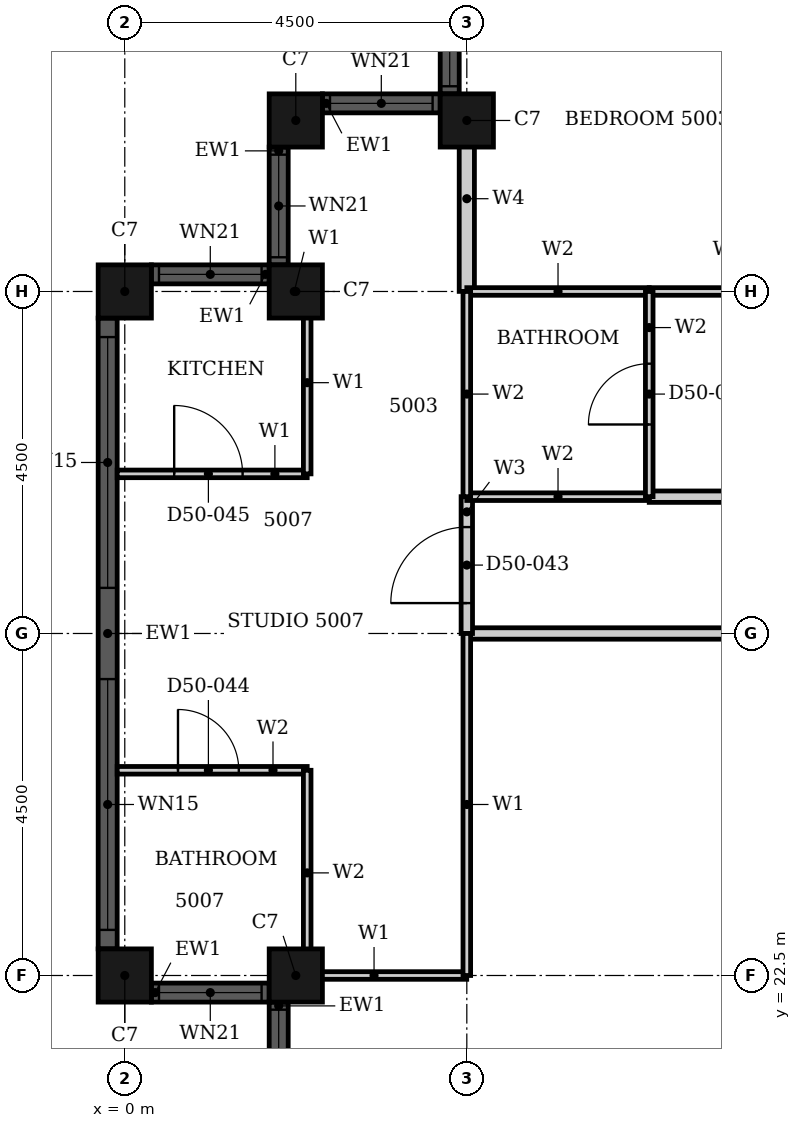
"""IFC4 building model, lengths in metres.
Left out: names, types, materials, properties, quantities, classifications, styles, units other than length and angle.
Written with IfcOpenShell. Run it as: python <this file> out.ifc"""

import sys

from ifc_helpers import new_model, si_unit, direction, frame, frame_2d, origin, origin_2d, place, context, subcontext, project, spatial, rectangle, hollow_rectangle, extrude, element, fill, save


model = new_model("IFC4")
c1 = context("Model", 3, precision=1e-05, world=origin(), true_north=direction((0.0, 1.0)))
c2 = subcontext(c1, "Body", "Model", "MODEL_VIEW")
j1 = project(units=[si_unit("LENGTHUNIT", "METRE"), si_unit("PLANEANGLEUNIT", "RADIAN")], contexts=[c1])
p1 = place(None, origin())
s1 = spatial("IfcSite", under=j1, at=p1, CompositionType="ELEMENT")
p2 = place(p1, origin())
s2 = spatial("IfcBuilding", under=s1, at=p2, CompositionType="ELEMENT")
p3 = place(p2, frame((0.0, 0.0, 199.8)))
s3 = spatial("IfcBuildingStorey", under=s2, at=p3, CompositionType="ELEMENT", Elevation=199.8)
for number, where, z_axis, x_axis in (
    (1, (4.5, 33.75, 0.0), (0.0, 0.0, 1.0), (1.0, 0.0, 0.0)),
    (2, (2.25, 33.75, 0.0), (0.0, 0.0, 1.0), (1.0, 0.0, 0.0)),
    (3, (2.25, 31.5, 0.0), (0.0, 0.0, 1.0), (1.0, 0.0, 0.0)),
    (4, (0.0, 31.5, 0.0), (0.0, 0.0, 1.0), (1.0, 0.0, 0.0)),
    (5, (0.0, 22.5, 0.0), (0.0, 0.0, 1.0), (1.0, 0.0, 0.0)),
    (6, (2.25, 22.5, 0.0), (0.0, 0.0, 1.0), (1.0, 0.0, 0.0)),
):
    element("IfcColumn", number, at=place(p3, frame(where, z_axis=z_axis, x_axis=x_axis)), inside=s3, PredefinedType="COLUMN", context=c2, shape_type="SweptSolid", body=[
        extrude(hollow_rectangle(XDim=0.7, YDim=0.7, WallThickness=0.022, at=origin_2d()), origin(), (0.0, 0.0, 1.0), 3.7),
    ])
p4 = place(p3, frame((4.275, 35.65, 0.0), z_axis=(0.0, 0.0, 1.0), x_axis=(0.0, -1.0, 0.0)))
e7 = element("IfcWall", 7, at=p4, inside=s3, PredefinedType="SOLIDWALL", context=c2, shape_type="SweptSolid", body=[
    extrude(rectangle(XDim=1.55, YDim=0.25, at=frame_2d((0.775, 0.0))), origin(), (0.0, 0.0, 1.0), 3.7),
])
p5 = place(p4, frame((0.1, 0.0, 0.9)))
e8 = element("IfcOpeningElement", 8, at=p5, cuts=e7, PredefinedType="OPENING", context=c2, shape_type="SweptSolid", body=[
    extrude(rectangle(XDim=1.35, YDim=1.85, at=frame_2d((0.675, 0.925))), frame((0.0, 0.135, 0.0), z_axis=(0.0, -1.0, 0.0), x_axis=(1.0, 0.0, 0.0)), (0.0, 0.0, 1.0), 0.27),
])
p6 = place(p3, frame((4.15, 33.975, 0.0), z_axis=(0.0, 0.0, 1.0), x_axis=(-1.0, 0.0, 0.0)))
e9 = element("IfcWall", 9, at=p6, inside=s3, PredefinedType="SOLIDWALL", context=c2, shape_type="SweptSolid", body=[
    extrude(rectangle(XDim=1.55, YDim=0.25, at=frame_2d((0.775, 0.0))), origin(), (0.0, 0.0, 1.0), 3.7),
])
p7 = place(p6, frame((0.1, 0.0, 0.9)))
e10 = element("IfcOpeningElement", 10, at=p7, cuts=e9, PredefinedType="OPENING", context=c2, shape_type="SweptSolid", body=[
    extrude(rectangle(XDim=1.35, YDim=1.85, at=frame_2d((0.675, 0.925))), frame((0.0, 0.135, 0.0), z_axis=(0.0, -1.0, 0.0), x_axis=(1.0, 0.0, 0.0)), (0.0, 0.0, 1.0), 0.27),
])
p8 = place(p3, frame((2.025, 33.4, 0.0), z_axis=(0.0, 0.0, 1.0), x_axis=(0.0, -1.0, 0.0)))
e11 = element("IfcWall", 11, at=p8, inside=s3, PredefinedType="SOLIDWALL", context=c2, shape_type="SweptSolid", body=[
    extrude(rectangle(XDim=1.55, YDim=0.25, at=frame_2d((0.775, 0.0))), origin(), (0.0, 0.0, 1.0), 3.7),
])
p9 = place(p8, frame((0.1, 0.0, 0.9)))
e12 = element("IfcOpeningElement", 12, at=p9, cuts=e11, PredefinedType="OPENING", context=c2, shape_type="SweptSolid", body=[
    extrude(rectangle(XDim=1.35, YDim=1.85, at=frame_2d((0.675, 0.925))), frame((0.0, 0.135, 0.0), z_axis=(0.0, -1.0, 0.0), x_axis=(1.0, 0.0, 0.0)), (0.0, 0.0, 1.0), 0.27),
])
p10 = place(p3, frame((1.9, 31.725, 0.0), z_axis=(0.0, 0.0, 1.0), x_axis=(-1.0, 0.0, 0.0)))
e13 = element("IfcWall", 13, at=p10, inside=s3, PredefinedType="SOLIDWALL", context=c2, shape_type="SweptSolid", body=[
    extrude(rectangle(XDim=1.55, YDim=0.25, at=frame_2d((0.775, 0.0))), origin(), (0.0, 0.0, 1.0), 3.7),
])
p11 = place(p10, frame((0.1, 0.0, 0.9)))
e14 = element("IfcOpeningElement", 14, at=p11, cuts=e13, PredefinedType="OPENING", context=c2, shape_type="SweptSolid", body=[
    extrude(rectangle(XDim=1.35, YDim=1.85, at=frame_2d((0.675, 0.925))), frame((0.0, 0.135, 0.0), z_axis=(0.0, -1.0, 0.0), x_axis=(1.0, 0.0, 0.0)), (0.0, 0.0, 1.0), 0.27),
])
p12 = place(p3, frame((-0.225, 31.15, 0.0), z_axis=(0.0, 0.0, 1.0), x_axis=(0.0, -1.0, 0.0)))
e15 = element("IfcWall", 15, at=p12, inside=s3, PredefinedType="SOLIDWALL", context=c2, shape_type="SweptSolid", body=[
    extrude(rectangle(XDim=8.3, YDim=0.25, at=frame_2d((4.15, 0.0))), origin(), (0.0, 0.0, 1.0), 3.7),
])
p13 = place(p12, frame((0.25, 0.0, 0.45)))
e16 = element("IfcOpeningElement", 16, at=p13, cuts=e15, PredefinedType="OPENING", context=c2, shape_type="SweptSolid", body=[
    extrude(rectangle(XDim=3.3, YDim=2.3, at=frame_2d((1.65, 1.15))), frame((0.0, 0.135, 0.0), z_axis=(0.0, -1.0, 0.0), x_axis=(1.0, 0.0, 0.0)), (0.0, 0.0, 1.0), 0.27),
])
p14 = place(p12, frame((4.75, 0.0, 0.45)))
e17 = element("IfcOpeningElement", 17, at=p14, cuts=e15, PredefinedType="OPENING", context=c2, shape_type="SweptSolid", body=[
    extrude(rectangle(XDim=3.3, YDim=2.3, at=frame_2d((1.65, 1.15))), frame((0.0, 0.135, 0.0), z_axis=(0.0, -1.0, 0.0), x_axis=(1.0, 0.0, 0.0)), (0.0, 0.0, 1.0), 0.27),
])
p15 = place(p3, frame((0.35, 22.275, 0.0), z_axis=(0.0, 0.0, 1.0), x_axis=(1.0, 0.0, 0.0)))
e18 = element("IfcWall", 18, at=p15, inside=s3, PredefinedType="SOLIDWALL", context=c2, shape_type="SweptSolid", body=[
    extrude(rectangle(XDim=1.55, YDim=0.25, at=frame_2d((0.775, 0.0))), origin(), (0.0, 0.0, 1.0), 3.7),
])
p16 = place(p15, frame((0.1, 0.0, 0.9)))
e19 = element("IfcOpeningElement", 19, at=p16, cuts=e18, PredefinedType="OPENING", context=c2, shape_type="SweptSolid", body=[
    extrude(rectangle(XDim=1.35, YDim=1.85, at=frame_2d((0.675, 0.925))), frame((0.0, 0.135, 0.0), z_axis=(0.0, -1.0, 0.0), x_axis=(1.0, 0.0, 0.0)), (0.0, 0.0, 1.0), 0.27),
])
p17 = place(p3, frame((2.025, 22.15, 0.0), z_axis=(0.0, 0.0, 1.0), x_axis=(0.0, -1.0, 0.0)))
e20 = element("IfcWall", 20, at=p17, inside=s3, PredefinedType="SOLIDWALL", context=c2, shape_type="SweptSolid", body=[
    extrude(rectangle(XDim=1.55, YDim=0.25, at=frame_2d((0.775, 0.0))), origin(), (0.0, 0.0, 1.0), 3.7),
])
p18 = place(p17, frame((0.1, 0.0, 0.9)))
e21 = element("IfcOpeningElement", 21, at=p18, cuts=e20, PredefinedType="OPENING", context=c2, shape_type="SweptSolid", body=[
    extrude(rectangle(XDim=1.35, YDim=1.85, at=frame_2d((0.675, 0.925))), frame((0.0, 0.135, 0.0), z_axis=(0.0, -1.0, 0.0), x_axis=(1.0, 0.0, 0.0)), (0.0, 0.0, 1.0), 0.27),
])
p19 = place(p3, frame((4.5, 27.0, 0.0), z_axis=(0.0, 0.0, 1.0), x_axis=(1.0, 0.0, 0.0)))
e22 = element("IfcWall", 22, at=p19, inside=s3, PredefinedType="PARTITIONING", context=c2, shape_type="SweptSolid", body=[
    extrude(rectangle(XDim=13.5, YDim=0.15, at=frame_2d((6.75, 0.0))), origin(), (0.0, 0.0, 1.0), 2.68),
])
p20 = place(p19, frame((5.35, 0.0, 0.0)))
e23 = element("IfcOpeningElement", 23, at=p20, cuts=e22, PredefinedType="OPENING", context=c2, shape_type="SweptSolid", body=[
    extrude(rectangle(XDim=1.0, YDim=2.1, at=frame_2d((0.5, 1.05))), frame((0.0, 0.085, 0.0), z_axis=(0.0, -1.0, 0.0), x_axis=(1.0, 0.0, 0.0)), (0.0, 0.0, 1.0), 0.17),
])
p21 = place(p3, frame((6.9, 28.8, 0.0), z_axis=(0.0, 0.0, 1.0), x_axis=(1.0, 0.0, 0.0)))
e24 = element("IfcWall", 24, at=p21, inside=s3, PredefinedType="PARTITIONING", context=c2, shape_type="SweptSolid", body=[
    extrude(rectangle(XDim=9.299, YDim=0.15, at=frame_2d((4.649, 0.0))), origin(), (0.0, 0.0, 1.0), 3.4),
])
p22 = place(p21, frame((1.3, 0.0, 0.0)))
e25 = element("IfcOpeningElement", 25, at=p22, cuts=e24, PredefinedType="OPENING", context=c2, shape_type="SweptSolid", body=[
    extrude(rectangle(XDim=1.0, YDim=2.2, at=frame_2d((0.5, 1.1))), frame((0.0, 0.085, 0.0), z_axis=(0.0, -1.0, 0.0), x_axis=(1.0, 0.0, 0.0)), (0.0, 0.0, 1.0), 0.17),
])
p23 = place(p3, frame((4.5, 27.0, 0.0), z_axis=(0.0, 0.0, 1.0), x_axis=(0.0, 1.0, 0.0)))
e26 = element("IfcWall", 26, at=p23, inside=s3, PredefinedType="PARTITIONING", context=c2, shape_type="SweptSolid", body=[
    extrude(rectangle(XDim=1.8, YDim=0.15, at=frame_2d((0.9, 0.0))), origin(), (0.0, 0.0, 1.0), 3.4),
])
p24 = place(p23, frame((0.4, 0.0, 0.0)))
e27 = element("IfcOpeningElement", 27, at=p24, cuts=e26, PredefinedType="OPENING", context=c2, shape_type="SweptSolid", body=[
    extrude(rectangle(XDim=1.0, YDim=2.2, at=frame_2d((0.5, 1.1))), frame((0.0, 0.085, 0.0), z_axis=(0.0, -1.0, 0.0), x_axis=(1.0, 0.0, 0.0)), (0.0, 0.0, 1.0), 0.17),
])
p25 = place(p3, frame((2.06, 22.5, 0.0), z_axis=(0.0, 0.0, 1.0), x_axis=(1.0, 0.0, 0.0)))
e28 = element("IfcWall", 28, at=p25, inside=s3, PredefinedType="PARTITIONING", context=c2, shape_type="SweptSolid", body=[
    extrude(rectangle(XDim=2.439, YDim=0.1, at=frame_2d((1.219, 0.0))), origin(), (0.0, 0.0, 1.0), 2.68),
])
p26 = place(p3, frame((-0.1, 29.1, 0.0), z_axis=(0.0, 0.0, 1.0), x_axis=(1.0, 0.0, 0.0)))
e29 = element("IfcWall", 29, at=p26, inside=s3, PredefinedType="PARTITIONING", context=c2, shape_type="SweptSolid", body=[
    extrude(rectangle(XDim=2.5, YDim=0.1, at=frame_2d((1.25, 0.0))), origin(), (0.0, 0.0, 1.0), 3.4),
])
p27 = place(p26, frame((0.75, 0.0, 0.0)))
e30 = element("IfcOpeningElement", 30, at=p27, cuts=e29, PredefinedType="OPENING", context=c2, shape_type="SweptSolid", body=[
    extrude(rectangle(XDim=0.9, YDim=2.1, at=frame_2d((0.45, 1.05))), frame((0.0, 0.06, 0.0), z_axis=(0.0, -1.0, 0.0), x_axis=(1.0, 0.0, 0.0)), (0.0, 0.0, 1.0), 0.12),
])
p28 = place(p3, frame((6.9, 31.5, 0.0), z_axis=(0.0, 0.0, 1.0), x_axis=(1.0, 0.0, 0.0)))
e31 = element("IfcWall", 31, at=p28, inside=s3, PredefinedType="PARTITIONING", context=c2, shape_type="SweptSolid", body=[
    extrude(rectangle(XDim=2.1, YDim=0.1, at=frame_2d((1.05, 0.0))), origin(), (0.0, 0.0, 1.0), 2.68),
])
p29 = place(p3, frame((2.06, 31.5, 0.0), z_axis=(0.0, 0.0, 1.0), x_axis=(1.0, 0.0, 0.0)))
e32 = element("IfcWall", 32, at=p29, inside=s3, PredefinedType="PARTITIONING", context=c2, shape_type="SweptSolid", body=[
    extrude(rectangle(XDim=0.34, YDim=0.1, at=frame_2d((0.17, 0.0))), origin(), (0.0, 0.0, 1.0), 3.4),
])
p30 = place(p3, frame((2.4, 29.1, 0.0), z_axis=(0.0, 0.0, 1.0), x_axis=(0.0, 1.0, 0.0)))
e33 = element("IfcWall", 33, at=p30, inside=s3, PredefinedType="PARTITIONING", context=c2, shape_type="SweptSolid", body=[
    extrude(rectangle(XDim=2.4, YDim=0.1, at=frame_2d((1.2, 0.0))), origin(), (0.0, 0.0, 1.0), 3.4),
])
p31 = place(p3, frame((4.5, 22.5, 0.0), z_axis=(0.0, 0.0, 1.0), x_axis=(0.0, 1.0, 0.0)))
e34 = element("IfcWall", 34, at=p31, inside=s3, PredefinedType="PARTITIONING", context=c2, shape_type="SweptSolid", body=[
    extrude(rectangle(XDim=4.5, YDim=0.1, at=frame_2d((2.25, 0.0))), origin(), (0.0, 0.0, 1.0), 3.4),
])
p32 = place(p3, frame((4.5, 31.501, 0.0), z_axis=(0.0, 0.0, 1.0), x_axis=(0.0, 1.0, 0.0)))
e35 = element("IfcWall", 35, at=p32, inside=s3, PredefinedType="PARTITIONING", context=c2, shape_type="SweptSolid", body=[
    extrude(rectangle(XDim=2.439, YDim=0.2, at=frame_2d((1.219, 0.0))), origin(), (0.0, 0.0, 1.0), 3.4),
])
p33 = place(p3, frame((-0.1, 25.2, 0.0), z_axis=(0.0, 0.0, 1.0), x_axis=(1.0, 0.0, 0.0)))
e36 = element("IfcWall", 36, at=p33, inside=s3, PredefinedType="PARTITIONING", context=c2, shape_type="SweptSolid", body=[
    extrude(rectangle(XDim=2.5, YDim=0.1, at=frame_2d((1.25, 0.0))), origin(), (0.0, 0.0, 1.0), 3.4),
])
p34 = place(p33, frame((0.8, 0.0, 0.0)))
e37 = element("IfcOpeningElement", 37, at=p34, cuts=e36, PredefinedType="OPENING", context=c2, shape_type="SweptSolid", body=[
    extrude(rectangle(XDim=0.8, YDim=2.1, at=frame_2d((0.4, 1.05))), frame((0.0, 0.06, 0.0), z_axis=(0.0, -1.0, 0.0), x_axis=(1.0, 0.0, 0.0)), (0.0, 0.0, 1.0), 0.12),
])
p35 = place(p3, frame((4.5, 28.8, 0.0), z_axis=(0.0, 0.0, 1.0), x_axis=(1.0, 0.0, 0.0)))
e38 = element("IfcWall", 38, at=p35, inside=s3, PredefinedType="PARTITIONING", context=c2, shape_type="SweptSolid", body=[
    extrude(rectangle(XDim=2.4, YDim=0.1, at=frame_2d((1.2, 0.0))), origin(), (0.0, 0.0, 1.0), 3.4),
])
p36 = place(p3, frame((4.5, 31.5, 0.0), z_axis=(0.0, 0.0, 1.0), x_axis=(1.0, 0.0, 0.0)))
e39 = element("IfcWall", 39, at=p36, inside=s3, PredefinedType="PARTITIONING", context=c2, shape_type="SweptSolid", body=[
    extrude(rectangle(XDim=2.4, YDim=0.1, at=frame_2d((1.2, 0.0))), origin(), (0.0, 0.0, 1.0), 2.68),
])
for number, where, z_axis, x_axis in (
    (40, (2.4, 22.5, 0.0), (0.0, 0.0, 1.0), (0.0, 1.0, 0.0)),
    (41, (4.5, 28.8, 0.0), (0.0, 0.0, 1.0), (0.0, 1.0, 0.0)),
):
    element("IfcWall", number, at=place(p3, frame(where, z_axis=z_axis, x_axis=x_axis)), inside=s3, PredefinedType="PARTITIONING", context=c2, shape_type="SweptSolid", body=[
        extrude(rectangle(XDim=2.7, YDim=0.1, at=frame_2d((1.35, 0.0))), origin(), (0.0, 0.0, 1.0), 3.4),
    ])
p37 = place(p3, frame((6.9, 28.8, 0.0), z_axis=(0.0, 0.0, 1.0), x_axis=(0.0, 1.0, 0.0)))
e42 = element("IfcWall", 42, at=p37, inside=s3, PredefinedType="PARTITIONING", context=c2, shape_type="SweptSolid", body=[
    extrude(rectangle(XDim=2.7, YDim=0.1, at=frame_2d((1.35, 0.0))), origin(), (0.0, 0.0, 1.0), 3.4),
])
p38 = place(p37, frame((0.95, 0.0, 0.0)))
e43 = element("IfcOpeningElement", 43, at=p38, cuts=e42, PredefinedType="OPENING", context=c2, shape_type="SweptSolid", body=[
    extrude(rectangle(XDim=0.8, YDim=2.1, at=frame_2d((0.4, 1.05))), frame((0.0, 0.06, 0.0), z_axis=(0.0, -1.0, 0.0), x_axis=(1.0, 0.0, 0.0)), (0.0, 0.0, 1.0), 0.12),
])
p39 = place(p5, origin())
e44 = element("IfcWindow", 44, at=p39, inside=s3, PartitioningType="SINGLE_PANEL", PredefinedType="WINDOW", context=c2, shape_type="SweptSolid", body=[
    extrude(rectangle(XDim=1.35, YDim=1.85, at=frame_2d((0.675, 0.925))), frame((0.0, 0.03, 0.0), z_axis=(0.0, -1.0, 0.0), x_axis=(1.0, 0.0, 0.0)), (0.0, 0.0, 1.0), 0.06),
])
fill(e8, e44)
p40 = place(p7, origin())
e45 = element("IfcWindow", 45, at=p40, inside=s3, PartitioningType="SINGLE_PANEL", PredefinedType="WINDOW", context=c2, shape_type="SweptSolid", body=[
    extrude(rectangle(XDim=1.35, YDim=1.85, at=frame_2d((0.675, 0.925))), frame((0.0, 0.03, 0.0), z_axis=(0.0, -1.0, 0.0), x_axis=(1.0, 0.0, 0.0)), (0.0, 0.0, 1.0), 0.06),
])
fill(e10, e45)
p41 = place(p9, origin())
e46 = element("IfcWindow", 46, at=p41, inside=s3, PartitioningType="SINGLE_PANEL", PredefinedType="WINDOW", context=c2, shape_type="SweptSolid", body=[
    extrude(rectangle(XDim=1.35, YDim=1.85, at=frame_2d((0.675, 0.925))), frame((0.0, 0.03, 0.0), z_axis=(0.0, -1.0, 0.0), x_axis=(1.0, 0.0, 0.0)), (0.0, 0.0, 1.0), 0.06),
])
fill(e12, e46)
p42 = place(p11, origin())
e47 = element("IfcWindow", 47, at=p42, inside=s3, PartitioningType="SINGLE_PANEL", PredefinedType="WINDOW", context=c2, shape_type="SweptSolid", body=[
    extrude(rectangle(XDim=1.35, YDim=1.85, at=frame_2d((0.675, 0.925))), frame((0.0, 0.03, 0.0), z_axis=(0.0, -1.0, 0.0), x_axis=(1.0, 0.0, 0.0)), (0.0, 0.0, 1.0), 0.06),
])
fill(e14, e47)
p43 = place(p13, origin())
e48 = element("IfcWindow", 48, at=p43, inside=s3, PartitioningType="SINGLE_PANEL", PredefinedType="WINDOW", context=c2, shape_type="SweptSolid", body=[
    extrude(rectangle(XDim=3.3, YDim=2.3, at=frame_2d((1.65, 1.15))), frame((0.0, 0.03, 0.0), z_axis=(0.0, -1.0, 0.0), x_axis=(1.0, 0.0, 0.0)), (0.0, 0.0, 1.0), 0.06),
])
fill(e16, e48)
p44 = place(p14, origin())
e49 = element("IfcWindow", 49, at=p44, inside=s3, PartitioningType="SINGLE_PANEL", PredefinedType="WINDOW", context=c2, shape_type="SweptSolid", body=[
    extrude(rectangle(XDim=3.3, YDim=2.3, at=frame_2d((1.65, 1.15))), frame((0.0, 0.03, 0.0), z_axis=(0.0, -1.0, 0.0), x_axis=(1.0, 0.0, 0.0)), (0.0, 0.0, 1.0), 0.06),
])
fill(e17, e49)
p45 = place(p16, origin())
e50 = element("IfcWindow", 50, at=p45, inside=s3, PartitioningType="SINGLE_PANEL", PredefinedType="WINDOW", context=c2, shape_type="SweptSolid", body=[
    extrude(rectangle(XDim=1.35, YDim=1.85, at=frame_2d((0.675, 0.925))), frame((0.0, 0.03, 0.0), z_axis=(0.0, -1.0, 0.0), x_axis=(1.0, 0.0, 0.0)), (0.0, 0.0, 1.0), 0.06),
])
fill(e19, e50)
p46 = place(p18, origin())
e51 = element("IfcWindow", 51, at=p46, inside=s3, PartitioningType="SINGLE_PANEL", PredefinedType="WINDOW", context=c2, shape_type="SweptSolid", body=[
    extrude(rectangle(XDim=1.35, YDim=1.85, at=frame_2d((0.675, 0.925))), frame((0.0, 0.03, 0.0), z_axis=(0.0, -1.0, 0.0), x_axis=(1.0, 0.0, 0.0)), (0.0, 0.0, 1.0), 0.06),
])
fill(e21, e51)
p47 = place(p38, origin())
e52 = element("IfcDoor", 52, at=p47, inside=s3, OperationType="SINGLE_SWING_RIGHT", PredefinedType="DOOR", context=c2, shape_type="SweptSolid", body=[
    extrude(rectangle(XDim=0.8, YDim=2.1, at=frame_2d((0.4, 1.05))), frame((0.0, 0.025, 0.0), z_axis=(0.0, -1.0, 0.0), x_axis=(1.0, 0.0, 0.0)), (0.0, 0.0, 1.0), 0.05),
])
fill(e43, e52)
p48 = place(p24, origin())
e53 = element("IfcDoor", 53, at=p48, inside=s3, OperationType="SINGLE_SWING_LEFT", PredefinedType="DOOR", context=c2, shape_type="SweptSolid", body=[
    extrude(rectangle(XDim=1.0, YDim=2.2, at=frame_2d((0.5, 1.1))), frame((0.0, 0.025, 0.0), z_axis=(0.0, -1.0, 0.0), x_axis=(1.0, 0.0, 0.0)), (0.0, 0.0, 1.0), 0.05),
])
fill(e27, e53)
p49 = place(p34, origin())
e54 = element("IfcDoor", 54, at=p49, inside=s3, OperationType="SINGLE_SWING_LEFT", PredefinedType="DOOR", context=c2, shape_type="SweptSolid", body=[
    extrude(rectangle(XDim=0.8, YDim=2.1, at=frame_2d((0.4, 1.05))), frame((0.0, 0.025, 0.0), z_axis=(0.0, -1.0, 0.0), x_axis=(1.0, 0.0, 0.0)), (0.0, 0.0, 1.0), 0.05),
])
fill(e37, e54)
p50 = place(p27, origin())
e55 = element("IfcDoor", 55, at=p50, inside=s3, OperationType="SINGLE_SWING_RIGHT", PredefinedType="DOOR", context=c2, shape_type="SweptSolid", body=[
    extrude(rectangle(XDim=0.9, YDim=2.1, at=frame_2d((0.45, 1.05))), frame((0.0, 0.025, 0.0), z_axis=(0.0, -1.0, 0.0), x_axis=(1.0, 0.0, 0.0)), (0.0, 0.0, 1.0), 0.05),
])
fill(e30, e55)
save(model, sys.argv[1])
